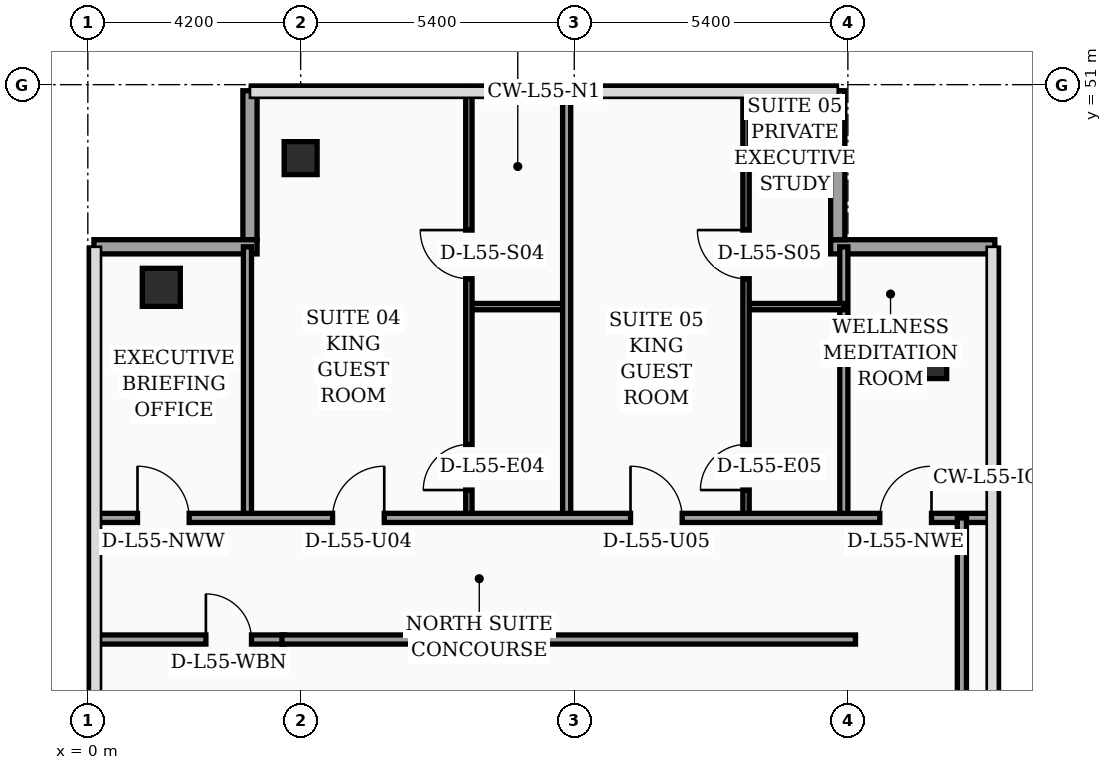
"""IFC4 building model, lengths in metres.
Left out: names, types, materials, properties, quantities, classifications, styles, units other than length and angle.
Written with IfcOpenShell. Run it as: python <this file> out.ifc"""

import sys

from ifc_helpers import new_model, si_unit, direction, frame, frame_2d, origin, origin_2d, place, context, subcontext, project, spatial, rectangle, hollow_rectangle, extrude, element, fill, save


model = new_model("IFC4")
c1 = context("Model", 3, precision=1e-05, world=origin(), true_north=direction((0.0, 1.0)))
c2 = subcontext(c1, "Body", "Model", "MODEL_VIEW")
j1 = project(units=[si_unit("LENGTHUNIT", "METRE"), si_unit("PLANEANGLEUNIT", "RADIAN")], contexts=[c1])
p1 = place(None, origin())
s1 = spatial("IfcSite", under=j1, at=p1, CompositionType="ELEMENT")
p2 = place(p1, origin())
s2 = spatial("IfcBuilding", under=s1, at=p2, CompositionType="ELEMENT")
p3 = place(p2, frame((0.0, 0.0, 223.1)))
s3 = spatial("IfcBuildingStorey", under=s2, at=p3, CompositionType="ELEMENT", Elevation=223.1)
p4 = place(p3, frame((1.45, 47.0, 0.0), z_axis=(0.0, 0.0, 1.0), x_axis=(1.0, 0.0, 0.0)))
e1 = element("IfcColumn", 1, at=p4, inside=s3, PredefinedType="COLUMN", context=c2, shape_type="SweptSolid", body=[
    extrude(hollow_rectangle(XDim=0.75, YDim=0.75, WallThickness=0.032, at=origin_2d()), origin(), (0.0, 0.0, 1.0), 3.56),
])
p5 = place(p3, frame((4.2, 49.55, 0.0), z_axis=(0.0, 0.0, 1.0), x_axis=(1.0, 0.0, 0.0)))
e2 = element("IfcColumn", 2, at=p5, inside=s3, PredefinedType="COLUMN", context=c2, shape_type="SweptSolid", body=[
    extrude(hollow_rectangle(XDim=0.65, YDim=0.65, WallThickness=0.028, at=origin_2d()), origin(), (0.0, 0.0, 1.0), 3.56),
])
p6 = place(p3, frame((16.55, 45.6, 0.0), z_axis=(0.0, 0.0, 1.0), x_axis=(1.0, 0.0, 0.0)))
e3 = element("IfcColumn", 3, at=p6, inside=s3, PredefinedType="COLUMN", context=c2, shape_type="SweptSolid", body=[
    extrude(rectangle(XDim=0.8, YDim=0.8, at=origin_2d()), origin(), (0.0, 0.0, 1.0), 3.56),
])
p7 = place(p3, frame((17.9, 47.8, 0.0), z_axis=(0.0, 0.0, 1.0), x_axis=(-1.0, 0.0, 0.0)))
e4 = element("IfcWall", 4, at=p7, inside=s3, PredefinedType="SOLIDWALL", context=c2, shape_type="SweptSolid", body=[
    extrude(rectangle(XDim=3.24, YDim=0.28, at=frame_2d((1.62, 0.0))), origin(), (0.0, 0.0, 1.0), 3.56),
])
p8 = place(p3, frame((14.8, 47.94, 0.0), z_axis=(0.0, 0.0, 1.0), x_axis=(0.0, 1.0, 0.0)))
e5 = element("IfcWall", 5, at=p8, inside=s3, PredefinedType="SOLIDWALL", context=c2, shape_type="SweptSolid", body=[
    extrude(rectangle(XDim=2.94, YDim=0.28, at=frame_2d((1.47, 0.0))), origin(), (0.0, 0.0, 1.0), 3.56),
])
p9 = place(p3, frame((3.2, 50.88, 0.0), z_axis=(0.0, 0.0, 1.0), x_axis=(0.0, -1.0, 0.0)))
e6 = element("IfcWall", 6, at=p9, inside=s3, PredefinedType="SOLIDWALL", context=c2, shape_type="SweptSolid", body=[
    extrude(rectangle(XDim=2.94, YDim=0.28, at=frame_2d((1.47, 0.0))), origin(), (0.0, 0.0, 1.0), 3.09),
])
p10 = place(p3, frame((3.34, 47.8, 0.0), z_axis=(0.0, 0.0, 1.0), x_axis=(-1.0, 0.0, 0.0)))
e7 = element("IfcWall", 7, at=p10, inside=s3, PredefinedType="SOLIDWALL", context=c2, shape_type="SweptSolid", body=[
    extrude(rectangle(XDim=3.22, YDim=0.28, at=frame_2d((1.61, 0.0))), origin(), (0.0, 0.0, 1.0), 3.09),
])
p11 = place(p3, frame((0.08, 40.05, 0.0), z_axis=(0.0, 0.0, 1.0), x_axis=(1.0, 0.0, 0.0)))
e8 = element("IfcWall", 8, at=p11, inside=s3, PredefinedType="PARTITIONING", context=c2, shape_type="SweptSolid", body=[
    extrude(rectangle(XDim=3.8, YDim=0.18, at=frame_2d((1.9, 0.0))), origin(), (0.0, 0.0, 1.0), 2.94),
])
p12 = place(p11, frame((2.25, 0.0, 0.0)))
e9 = element("IfcOpeningElement", 9, at=p12, cuts=e8, PredefinedType="OPENING", context=c2, shape_type="SweptSolid", body=[
    extrude(rectangle(XDim=0.9, YDim=2.15, at=frame_2d((0.45, 1.075))), frame((0.0, 0.1, 0.0), z_axis=(0.0, -1.0, 0.0), x_axis=(1.0, 0.0, 0.0)), (0.0, 0.0, 1.0), 0.2),
])
p13 = place(p3, frame((3.15, 42.45, 0.0), z_axis=(0.0, 0.0, 1.0), x_axis=(0.0, 1.0, 0.0)))
e10 = element("IfcWall", 10, at=p13, inside=s3, PredefinedType="PARTITIONING", context=c2, shape_type="SweptSolid", body=[
    extrude(rectangle(XDim=5.35, YDim=0.16, at=frame_2d((2.675, 0.0))), origin(), (0.0, 0.0, 1.0), 3.14),
])
p14 = place(p3, frame((14.92, 42.45, 0.0), z_axis=(0.0, 0.0, 1.0), x_axis=(0.0, 1.0, 0.0)))
e11 = element("IfcWall", 11, at=p14, inside=s3, PredefinedType="PARTITIONING", context=c2, shape_type="SweptSolid", body=[
    extrude(rectangle(XDim=5.35, YDim=0.16, at=frame_2d((2.675, 0.0))), origin(), (0.0, 0.0, 1.0), 3.09),
])
p15 = place(p3, frame((7.52, 46.62, 0.0), z_axis=(0.0, 0.0, 1.0), x_axis=(1.0, 0.0, 0.0)))
e12 = element("IfcWall", 12, at=p15, inside=s3, PredefinedType="PARTITIONING", context=c2, shape_type="SweptSolid", body=[
    extrude(rectangle(XDim=1.93, YDim=0.125, at=frame_2d((0.965, 0.0))), origin(), (0.0, 0.0, 1.0), 3.56),
])
p16 = place(p3, frame((7.52, 42.45, 0.0), z_axis=(0.0, 0.0, 1.0), x_axis=(0.0, 1.0, 0.0)))
e13 = element("IfcWall", 13, at=p16, inside=s3, PredefinedType="PARTITIONING", context=c2, shape_type="SweptSolid", body=[
    extrude(rectangle(XDim=8.49, YDim=0.125, at=frame_2d((4.245, 0.0))), origin(), (0.0, 0.0, 1.0), 3.09),
])
p17 = place(p16, frame((0.55, 0.0, 0.0)))
e14 = element("IfcOpeningElement", 14, at=p17, cuts=e13, PredefinedType="OPENING", context=c2, shape_type="SweptSolid", body=[
    extrude(rectangle(XDim=0.9, YDim=2.15, at=frame_2d((0.45, 1.075))), frame((0.0, 0.073, 0.0), z_axis=(0.0, -1.0, 0.0), x_axis=(1.0, 0.0, 0.0)), (0.0, 0.0, 1.0), 0.145),
])
p18 = place(p16, frame((4.72, 0.0, 0.0)))
e15 = element("IfcOpeningElement", 15, at=p18, cuts=e13, PredefinedType="OPENING", context=c2, shape_type="SweptSolid", body=[
    extrude(rectangle(XDim=0.96, YDim=2.2, at=frame_2d((0.48, 1.1))), frame((0.0, 0.073, 0.0), z_axis=(0.0, -1.0, 0.0), x_axis=(1.0, 0.0, 0.0)), (0.0, 0.0, 1.0), 0.145),
])
p19 = place(p3, frame((12.99, 46.62, 0.0), z_axis=(0.0, 0.0, 1.0), x_axis=(1.0, 0.0, 0.0)))
e16 = element("IfcWall", 16, at=p19, inside=s3, PredefinedType="PARTITIONING", context=c2, shape_type="SweptSolid", body=[
    extrude(rectangle(XDim=1.93, YDim=0.125, at=frame_2d((0.965, 0.0))), origin(), (0.0, 0.0, 1.0), 3.09),
])
p20 = place(p3, frame((12.99, 42.45, 0.0), z_axis=(0.0, 0.0, 1.0), x_axis=(0.0, 1.0, 0.0)))
e17 = element("IfcWall", 17, at=p20, inside=s3, PredefinedType="PARTITIONING", context=c2, shape_type="SweptSolid", body=[
    extrude(rectangle(XDim=8.49, YDim=0.125, at=frame_2d((4.245, 0.0))), origin(), (0.0, 0.0, 1.0), 3.09),
])
p21 = place(p20, frame((0.55, 0.0, 0.0)))
e18 = element("IfcOpeningElement", 18, at=p21, cuts=e17, PredefinedType="OPENING", context=c2, shape_type="SweptSolid", body=[
    extrude(rectangle(XDim=0.9, YDim=2.15, at=frame_2d((0.45, 1.075))), frame((0.0, 0.073, 0.0), z_axis=(0.0, -1.0, 0.0), x_axis=(1.0, 0.0, 0.0)), (0.0, 0.0, 1.0), 0.145),
])
p22 = place(p20, frame((4.72, 0.0, 0.0)))
e19 = element("IfcOpeningElement", 19, at=p22, cuts=e17, PredefinedType="OPENING", context=c2, shape_type="SweptSolid", body=[
    extrude(rectangle(XDim=0.96, YDim=2.2, at=frame_2d((0.48, 1.1))), frame((0.0, 0.073, 0.0), z_axis=(0.0, -1.0, 0.0), x_axis=(1.0, 0.0, 0.0)), (0.0, 0.0, 1.0), 0.145),
])
p23 = place(p3, frame((9.45, 42.45, 0.0), z_axis=(0.0, 0.0, 1.0), x_axis=(0.0, 1.0, 0.0)))
e20 = element("IfcWall", 20, at=p23, inside=s3, PredefinedType="PARTITIONING", context=c2, shape_type="SweptSolid", body=[
    extrude(rectangle(XDim=8.49, YDim=0.16, at=frame_2d((4.245, 0.0))), origin(), (0.0, 0.0, 1.0), 3.09),
])
p24 = place(p3, frame((0.08, 42.45, 0.0), z_axis=(0.0, 0.0, 1.0), x_axis=(1.0, 0.0, 0.0)))
e21 = element("IfcWall", 21, at=p24, inside=s3, PredefinedType="PARTITIONING", context=c2, shape_type="SweptSolid", body=[
    extrude(rectangle(XDim=17.77, YDim=0.18, at=frame_2d((8.885, 0.0))), origin(), (0.0, 0.0, 1.0), 2.94),
])
p25 = place(p24, frame((0.9, 0.0, 0.0)))
e22 = element("IfcOpeningElement", 22, at=p25, cuts=e21, PredefinedType="OPENING", context=c2, shape_type="SweptSolid", body=[
    extrude(rectangle(XDim=1.02, YDim=2.2, at=frame_2d((0.51, 1.1))), frame((0.0, 0.1, 0.0), z_axis=(0.0, -1.0, 0.0), x_axis=(1.0, 0.0, 0.0)), (0.0, 0.0, 1.0), 0.2),
])
p26 = place(p24, frame((4.75, 0.0, 0.0)))
e23 = element("IfcOpeningElement", 23, at=p26, cuts=e21, PredefinedType="OPENING", context=c2, shape_type="SweptSolid", body=[
    extrude(rectangle(XDim=1.02, YDim=2.2, at=frame_2d((0.51, 1.1))), frame((0.0, 0.1, 0.0), z_axis=(0.0, -1.0, 0.0), x_axis=(1.0, 0.0, 0.0)), (0.0, 0.0, 1.0), 0.2),
])
p27 = place(p24, frame((10.63, 0.0, 0.0)))
e24 = element("IfcOpeningElement", 24, at=p27, cuts=e21, PredefinedType="OPENING", context=c2, shape_type="SweptSolid", body=[
    extrude(rectangle(XDim=1.02, YDim=2.2, at=frame_2d((0.51, 1.1))), frame((0.0, 0.1, 0.0), z_axis=(0.0, -1.0, 0.0), x_axis=(1.0, 0.0, 0.0)), (0.0, 0.0, 1.0), 0.2),
])
p28 = place(p24, frame((15.55, 0.0, 0.0)))
e25 = element("IfcOpeningElement", 25, at=p28, cuts=e21, PredefinedType="OPENING", context=c2, shape_type="SweptSolid", body=[
    extrude(rectangle(XDim=1.02, YDim=2.2, at=frame_2d((0.51, 1.1))), frame((0.0, 0.1, 0.0), z_axis=(0.0, -1.0, 0.0), x_axis=(1.0, 0.0, 0.0)), (0.0, 0.0, 1.0), 0.2),
])
p29 = place(p3, frame((17.25, 24.3, 0.0), z_axis=(0.0, 0.0, 1.0), x_axis=(0.0, 1.0, 0.0)))
e26 = element("IfcWall", 26, at=p29, inside=s3, PredefinedType="PARTITIONING", context=c2, shape_type="SweptSolid", body=[
    extrude(rectangle(XDim=18.15, YDim=0.18, at=frame_2d((9.075, 0.0))), origin(), (0.0, 0.0, 1.0), 2.94),
])
p30 = place(p29, frame((3.2, 0.0, 0.0)))
e27 = element("IfcOpeningElement", 27, at=p30, cuts=e26, PredefinedType="OPENING", context=c2, shape_type="SweptSolid", body=[
    extrude(rectangle(XDim=1.02, YDim=2.2, at=frame_2d((0.51, 1.1))), frame((0.0, 0.1, 0.0), z_axis=(0.0, -1.0, 0.0), x_axis=(1.0, 0.0, 0.0)), (0.0, 0.0, 1.0), 0.2),
])
p31 = place(p3, frame((3.83, 40.05, 0.0), z_axis=(0.0, 0.0, 1.0), x_axis=(1.0, 0.0, 0.0)))
e28 = element("IfcWall", 28, at=p31, inside=s3, PredefinedType="PARTITIONING", context=c2, shape_type="SweptSolid", body=[
    extrude(rectangle(XDim=11.32, YDim=0.18, at=frame_2d((5.66, 0.0))), origin(), (0.0, 0.0, 1.0), 2.94),
])
p32 = place(p12, origin())
e29 = element("IfcDoor", 29, at=p32, inside=s3, OperationType="SINGLE_SWING_LEFT", PredefinedType="DOOR", context=c2, shape_type="SweptSolid", body=[
    extrude(rectangle(XDim=0.9, YDim=2.15, at=frame_2d((0.45, 1.075))), frame((0.0, 0.025, 0.0), z_axis=(0.0, -1.0, 0.0), x_axis=(1.0, 0.0, 0.0)), (0.0, 0.0, 1.0), 0.05),
])
fill(e9, e29)
p33 = place(p17, origin())
e30 = element("IfcDoor", 30, at=p33, inside=s3, OperationType="SINGLE_SWING_LEFT", PredefinedType="DOOR", context=c2, shape_type="SweptSolid", body=[
    extrude(rectangle(XDim=0.9, YDim=2.15, at=frame_2d((0.45, 1.075))), frame((0.0, 0.025, 0.0), z_axis=(0.0, -1.0, 0.0), x_axis=(1.0, 0.0, 0.0)), (0.0, 0.0, 1.0), 0.05),
])
fill(e14, e30)
p34 = place(p18, origin())
e31 = element("IfcDoor", 31, at=p34, inside=s3, OperationType="SINGLE_SWING_RIGHT", PredefinedType="DOOR", context=c2, shape_type="SweptSolid", body=[
    extrude(rectangle(XDim=0.96, YDim=2.2, at=frame_2d((0.48, 1.1))), frame((0.0, 0.025, 0.0), z_axis=(0.0, -1.0, 0.0), x_axis=(1.0, 0.0, 0.0)), (0.0, 0.0, 1.0), 0.05),
])
fill(e15, e31)
p35 = place(p21, origin())
e32 = element("IfcDoor", 32, at=p35, inside=s3, OperationType="SINGLE_SWING_LEFT", PredefinedType="DOOR", context=c2, shape_type="SweptSolid", body=[
    extrude(rectangle(XDim=0.9, YDim=2.15, at=frame_2d((0.45, 1.075))), frame((0.0, 0.025, 0.0), z_axis=(0.0, -1.0, 0.0), x_axis=(1.0, 0.0, 0.0)), (0.0, 0.0, 1.0), 0.05),
])
fill(e18, e32)
p36 = place(p22, origin())
e33 = element("IfcDoor", 33, at=p36, inside=s3, OperationType="SINGLE_SWING_RIGHT", PredefinedType="DOOR", context=c2, shape_type="SweptSolid", body=[
    extrude(rectangle(XDim=0.96, YDim=2.2, at=frame_2d((0.48, 1.1))), frame((0.0, 0.025, 0.0), z_axis=(0.0, -1.0, 0.0), x_axis=(1.0, 0.0, 0.0)), (0.0, 0.0, 1.0), 0.05),
])
fill(e19, e33)
p37 = place(p25, origin())
e34 = element("IfcDoor", 34, at=p37, inside=s3, OperationType="SINGLE_SWING_LEFT", PredefinedType="DOOR", context=c2, shape_type="SweptSolid", body=[
    extrude(rectangle(XDim=1.02, YDim=2.2, at=frame_2d((0.51, 1.1))), frame((0.0, 0.025, 0.0), z_axis=(0.0, -1.0, 0.0), x_axis=(1.0, 0.0, 0.0)), (0.0, 0.0, 1.0), 0.05),
])
fill(e22, e34)
p38 = place(p26, origin())
e35 = element("IfcDoor", 35, at=p38, inside=s3, OperationType="SINGLE_SWING_RIGHT", PredefinedType="DOOR", context=c2, shape_type="SweptSolid", body=[
    extrude(rectangle(XDim=1.02, YDim=2.2, at=frame_2d((0.51, 1.1))), frame((0.0, 0.025, 0.0), z_axis=(0.0, -1.0, 0.0), x_axis=(1.0, 0.0, 0.0)), (0.0, 0.0, 1.0), 0.05),
])
fill(e23, e35)
p39 = place(p27, origin())
e36 = element("IfcDoor", 36, at=p39, inside=s3, OperationType="SINGLE_SWING_LEFT", PredefinedType="DOOR", context=c2, shape_type="SweptSolid", body=[
    extrude(rectangle(XDim=1.02, YDim=2.2, at=frame_2d((0.51, 1.1))), frame((0.0, 0.025, 0.0), z_axis=(0.0, -1.0, 0.0), x_axis=(1.0, 0.0, 0.0)), (0.0, 0.0, 1.0), 0.05),
])
fill(e24, e36)
p40 = place(p28, origin())
e37 = element("IfcDoor", 37, at=p40, inside=s3, OperationType="SINGLE_SWING_RIGHT", PredefinedType="DOOR", context=c2, shape_type="SweptSolid", body=[
    extrude(rectangle(XDim=1.02, YDim=2.2, at=frame_2d((0.51, 1.1))), frame((0.0, 0.025, 0.0), z_axis=(0.0, -1.0, 0.0), x_axis=(1.0, 0.0, 0.0)), (0.0, 0.0, 1.0), 0.05),
])
fill(e25, e37)
save(model, sys.argv[1])
